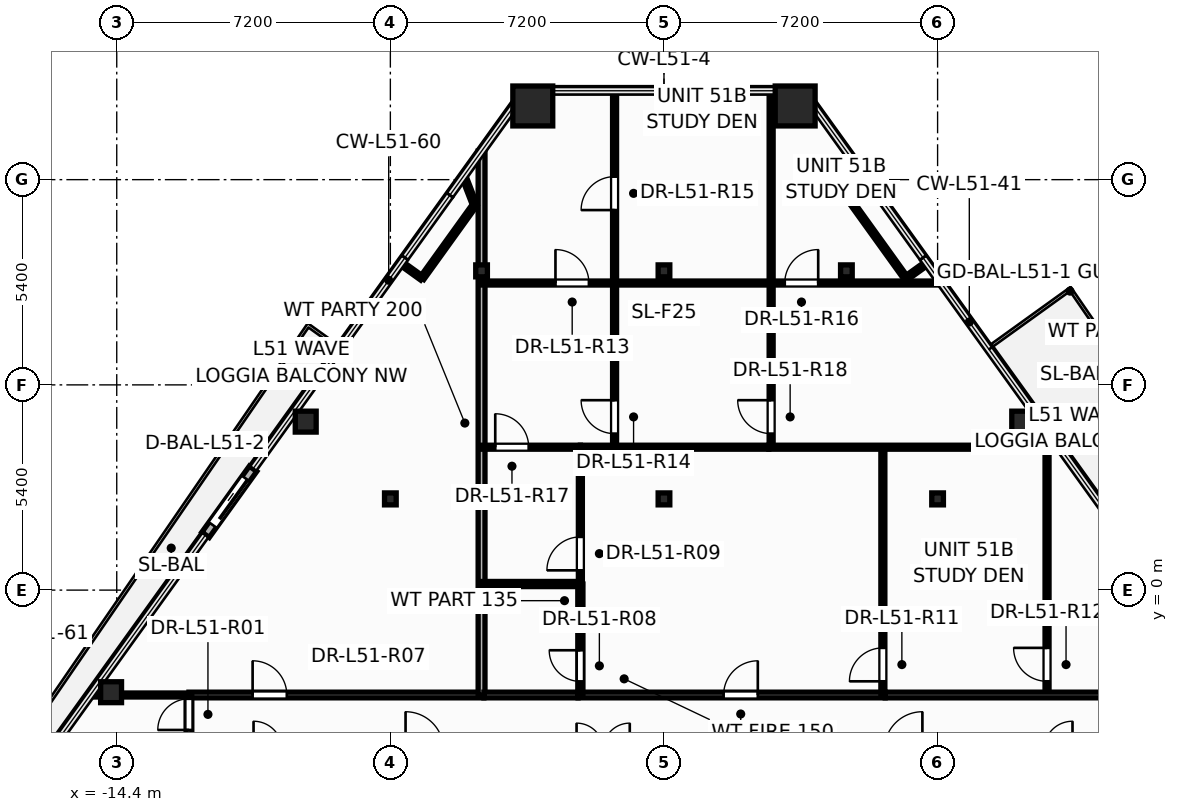
"""IFC4 building model, lengths in metres.
Left out: names, types, materials, properties, quantities, classifications, styles, units other than length and angle.
Written with IfcOpenShell. Run it as: python <this file> out.ifc"""

import sys

from ifc_helpers import new_model, si_unit, direction, frame, frame_2d, origin, origin_2d, place, context, subcontext, project, spatial, rectangle, hollow_rectangle, hollow_circle, i_section, extrude, element, fill, save


model = new_model("IFC4")
c1 = context("Model", 3, precision=1e-05, world=origin(), true_north=direction((0.0, 1.0)))
c2 = subcontext(c1, "Body", "Model", "MODEL_VIEW")
j1 = project(units=[si_unit("LENGTHUNIT", "METRE"), si_unit("PLANEANGLEUNIT", "RADIAN")], contexts=[c1])
p1 = place(None, origin())
s1 = spatial("IfcSite", under=j1, at=p1, CompositionType="ELEMENT")
p2 = place(p1, origin())
s2 = spatial("IfcBuilding", under=s1, at=p2, CompositionType="ELEMENT")
p3 = place(p2, frame((0.0, 0.0, 196.5)))
s3 = spatial("IfcBuildingStorey", under=s2, at=p3, CompositionType="ELEMENT", Elevation=196.5)
for number, where, z_axis, x_axis in (
    (1, (3.452, 12.739, 0.0), (0.0, 0.0, 1.0), (1.0, 0.0, 0.0)),
    (2, (-3.452, 12.739, 0.0), (0.0, 0.0, 1.0), (1.0, 0.0, 0.0)),
):
    element("IfcColumn", number, at=place(p3, frame(where, z_axis=z_axis, x_axis=x_axis)), inside=s3, PredefinedType="COLUMN", context=c2, shape_type="SweptSolid", body=[
        extrude(hollow_rectangle(XDim=1.05, YDim=1.05, WallThickness=0.045, at=origin_2d()), origin(), (0.0, 0.0, 1.0), 3.6),
    ])
for number, where, z_axis, x_axis in (
    (3, (9.427, 4.433, 0.0), (0.0, 0.0, 1.0), (1.0, 0.0, 0.0)),
    (4, (-9.427, 4.433, 0.0), (0.0, 0.0, 1.0), (1.0, 0.0, 0.0)),
    (5, (-14.549, -2.686, 0.0), (0.0, 0.0, 1.0), (1.0, 0.0, 0.0)),
):
    element("IfcColumn", number, at=place(p3, frame(where, z_axis=z_axis, x_axis=x_axis)), inside=s3, PredefinedType="COLUMN", context=c2, shape_type="SweptSolid", body=[
        extrude(hollow_circle(Radius=0.275, WallThickness=0.024, at=origin_2d()), origin(), (0.0, 0.0, 1.0), 3.6),
    ])
for number, where, z_axis, x_axis in (
    (6, (-7.2, 2.4, 0.0), (0.0, 0.0, 1.0), (1.0, 0.0, 0.0)),
    (7, (0.0, 2.4, 0.0), (0.0, 0.0, 1.0), (1.0, 0.0, 0.0)),
    (8, (7.2, 2.4, 0.0), (0.0, 0.0, 1.0), (1.0, 0.0, 0.0)),
    (9, (-4.8, 8.4, 0.0), (0.0, 0.0, 1.0), (1.0, 0.0, 0.0)),
    (10, (0.0, 8.4, 0.0), (0.0, 0.0, 1.0), (1.0, 0.0, 0.0)),
    (11, (4.8, 8.4, 0.0), (0.0, 0.0, 1.0), (1.0, 0.0, 0.0)),
):
    element("IfcColumn", number, at=place(p3, frame(where, z_axis=z_axis, x_axis=x_axis)), inside=s3, PredefinedType="COLUMN", context=c2, shape_type="SweptSolid", body=[
        extrude(i_section(OverallWidth=0.307, OverallDepth=0.314, WebThickness=0.012, FlangeThickness=0.019, at=origin_2d()), origin(), (0.0, 0.0, 1.0), 3.6),
    ])
p4 = place(p3, frame((-10.813, 3.192, -0.015), z_axis=(0.0, 0.0, 1.0), x_axis=(-0.583965085393, -0.811778774693, 0.0)))
e12 = element("IfcWall", 12, at=p4, inside=s3, PredefinedType="STANDARD", context=c2, shape_type="SweptSolid", body=[
    extrude(rectangle(XDim=2.14, YDim=0.24, at=frame_2d((1.07, 0.0))), origin(), (0.0, 0.0, 1.0), 2.807),
])
p5 = place(p4, frame((0.32, 0.0, 0.015)))
e13 = element("IfcOpeningElement", 13, at=p5, cuts=e12, PredefinedType="OPENING", context=c2, shape_type="SweptSolid", body=[
    extrude(rectangle(XDim=1.506, YDim=2.204, at=frame_2d((0.75, 1.102))), frame((0.0, 0.13, 0.0), z_axis=(0.0, -1.0, 0.0), x_axis=(1.0, 0.0, 0.0)), (0.0, 0.0, 1.0), 0.26),
])
p6 = place(p3, frame((-2.26, -2.76, 0.0), z_axis=(0.0, 0.0, 1.0), x_axis=(1.0, 0.0, 0.0)))
e14 = element("IfcWall", 14, at=p6, inside=s3, PredefinedType="PARTITIONING", context=c2, shape_type="SweptSolid", body=[
    extrude(rectangle(XDim=8.08, YDim=0.15, at=frame_2d((4.04, 0.0))), origin(), (0.0, 0.0, 1.0), 2.325),
])
p7 = place(p6, frame((3.829, 0.0, 0.0)))
e15 = element("IfcOpeningElement", 15, at=p7, cuts=e14, PredefinedType="OPENING", context=c2, shape_type="SweptSolid", body=[
    extrude(rectangle(XDim=0.906, YDim=2.104, at=frame_2d((0.45, 1.052))), frame((0.0, 0.085, 0.0), z_axis=(0.0, -1.0, 0.0), x_axis=(1.0, 0.0, 0.0)), (0.0, 0.0, 1.0), 0.17),
])
p8 = place(p3, frame((-12.5, -2.76, 0.0), z_axis=(0.0, 0.0, 1.0), x_axis=(1.0, 0.0, 0.0)))
e16 = element("IfcWall", 16, at=p8, inside=s3, PredefinedType="PARTITIONING", context=c2, shape_type="SweptSolid", body=[
    extrude(rectangle(XDim=7.76, YDim=0.15, at=frame_2d((3.88, 0.0))), origin(), (0.0, 0.0, 1.0), 2.325),
])
p9 = place(p8, frame((1.675, 0.0, 0.0)))
e17 = element("IfcOpeningElement", 17, at=p9, cuts=e16, PredefinedType="OPENING", context=c2, shape_type="SweptSolid", body=[
    extrude(rectangle(XDim=0.906, YDim=2.104, at=frame_2d((0.45, 1.052))), frame((0.0, 0.085, 0.0), z_axis=(0.0, -1.0, 0.0), x_axis=(1.0, 0.0, 0.0)), (0.0, 0.0, 1.0), 0.17),
])
p10 = place(p3, frame((10.08, -2.76, 0.0), z_axis=(0.0, 0.0, 1.0), x_axis=(0.0, 1.0, 0.0)))
e18 = element("IfcWall", 18, at=p10, inside=s3, PredefinedType="PARTITIONING", context=c2, shape_type="SweptSolid", body=[
    extrude(rectangle(XDim=6.971, YDim=0.105, at=frame_2d((3.485, 0.0))), origin(), (0.0, 0.0, 1.0), 2.625),
])
p11 = place(p10, frame((0.36, 0.0, 0.0)))
e19 = element("IfcOpeningElement", 19, at=p11, cuts=e18, PredefinedType="OPENING", context=c2, shape_type="SweptSolid", body=[
    extrude(rectangle(XDim=0.886, YDim=2.104, at=frame_2d((0.44, 1.052))), frame((0.0, 0.062, 0.0), z_axis=(0.0, -1.0, 0.0), x_axis=(1.0, 0.0, 0.0)), (0.0, 0.0, 1.0), 0.125),
])
p12 = place(p3, frame((5.76, -2.76, 0.0), z_axis=(0.0, 0.0, 1.0), x_axis=(0.0, 1.0, 0.0)))
e20 = element("IfcWall", 20, at=p12, inside=s3, PredefinedType="PARTITIONING", context=c2, shape_type="SweptSolid", body=[
    extrude(rectangle(XDim=6.52, YDim=0.105, at=frame_2d((3.26, 0.0))), origin(), (0.0, 0.0, 1.0), 2.325),
])
p13 = place(p12, frame((0.36, 0.0, 0.0)))
e21 = element("IfcOpeningElement", 21, at=p13, cuts=e20, PredefinedType="OPENING", context=c2, shape_type="SweptSolid", body=[
    extrude(rectangle(XDim=0.886, YDim=2.104, at=frame_2d((0.44, 1.052))), frame((0.0, 0.062, 0.0), z_axis=(0.0, -1.0, 0.0), x_axis=(1.0, 0.0, 0.0)), (0.0, 0.0, 1.0), 0.125),
])
p14 = place(p3, frame((-1.3, 8.08, 0.0), z_axis=(0.0, 0.0, 1.0), x_axis=(0.0, 1.0, 0.0)))
e22 = element("IfcWall", 22, at=p14, inside=s3, PredefinedType="PARTITIONING", context=c2, shape_type="SweptSolid", body=[
    extrude(rectangle(XDim=5.059, YDim=0.105, at=frame_2d((2.529, 0.0))), origin(), (0.0, 0.0, 1.0), 2.625),
])
p15 = place(p14, frame((1.919, 0.0, 0.0)))
e23 = element("IfcOpeningElement", 23, at=p15, cuts=e22, PredefinedType="OPENING", context=c2, shape_type="SweptSolid", body=[
    extrude(rectangle(XDim=0.886, YDim=2.104, at=frame_2d((0.44, 1.052))), frame((0.0, 0.062, 0.0), z_axis=(0.0, -1.0, 0.0), x_axis=(1.0, 0.0, 0.0)), (0.0, 0.0, 1.0), 0.125),
])
p16 = place(p3, frame((2.82, 8.08, 0.0), z_axis=(0.0, 0.0, 1.0), x_axis=(0.0, 1.0, 0.0)))
e24 = element("IfcWall", 24, at=p16, inside=s3, PredefinedType="PARTITIONING", context=c2, shape_type="SweptSolid", body=[
    extrude(rectangle(XDim=5.059, YDim=0.105, at=frame_2d((2.529, 0.0))), origin(), (0.0, 0.0, 1.0), 2.625),
])
p17 = place(p3, frame((2.76, 3.76, 0.0), z_axis=(0.0, 0.0, 1.0), x_axis=(1.0, 0.0, 0.0)))
e25 = element("IfcWall", 25, at=p17, inside=s3, PredefinedType="PARTITIONING", context=c2, shape_type="SweptSolid", body=[
    extrude(rectangle(XDim=7.644, YDim=0.105, at=frame_2d((3.822, 0.0))), origin(), (0.0, 0.0, 1.0), 2.625),
])
p18 = place(p3, frame((2.82, 8.08, 0.0), z_axis=(0.0, 0.0, 1.0), x_axis=(1.0, 0.0, 0.0)))
e26 = element("IfcWall", 26, at=p18, inside=s3, PredefinedType="PARTITIONING", context=c2, shape_type="SweptSolid", body=[
    extrude(rectangle(XDim=4.476, YDim=0.105, at=frame_2d((2.238, 0.0))), origin(), (0.0, 0.0, 1.0), 2.625),
])
p19 = place(p18, frame((0.358, 0.0, 0.0)))
e27 = element("IfcOpeningElement", 27, at=p19, cuts=e26, PredefinedType="OPENING", context=c2, shape_type="SweptSolid", body=[
    extrude(rectangle(XDim=0.886, YDim=2.104, at=frame_2d((0.44, 1.052))), frame((0.0, 0.062, 0.0), z_axis=(0.0, -1.0, 0.0), x_axis=(1.0, 0.0, 0.0)), (0.0, 0.0, 1.0), 0.125),
])
p20 = place(p3, frame((-4.8, -2.76, 0.0), z_axis=(0.0, 0.0, 1.0), x_axis=(0.0, 1.0, 0.0)))
e28 = element("IfcWall", 28, at=p20, inside=s3, PredefinedType="PARTITIONING", context=c2, shape_type="SweptSolid", body=[
    extrude(rectangle(XDim=14.31, YDim=0.18, at=frame_2d((7.155, 0.0))), origin(), (0.0, 0.0, 1.0), 2.325),
])
p21 = place(p3, frame((5.822, -2.76, 0.0), z_axis=(0.0, 0.0, 1.0), x_axis=(1.0, 0.0, 0.0)))
e29 = element("IfcWall", 29, at=p21, inside=s3, PredefinedType="PARTITIONING", context=c2, shape_type="SweptSolid", body=[
    extrude(rectangle(XDim=6.678, YDim=0.15, at=frame_2d((3.339, 0.0))), origin(), (0.0, 0.0, 1.0), 2.325),
])
p22 = place(p3, frame((-1.3, 3.76, 0.0), z_axis=(0.0, 0.0, 1.0), x_axis=(0.0, 1.0, 0.0)))
e30 = element("IfcWall", 30, at=p22, inside=s3, PredefinedType="PARTITIONING", context=c2, shape_type="SweptSolid", body=[
    extrude(rectangle(XDim=4.32, YDim=0.105, at=frame_2d((2.16, 0.0))), origin(), (0.0, 0.0, 1.0), 3.35),
])
p23 = place(p22, frame((0.357, 0.0, 0.0)))
e31 = element("IfcOpeningElement", 31, at=p23, cuts=e30, PredefinedType="OPENING", context=c2, shape_type="SweptSolid", body=[
    extrude(rectangle(XDim=0.886, YDim=2.104, at=frame_2d((0.44, 1.052))), frame((0.0, 0.062, 0.0), z_axis=(0.0, -1.0, 0.0), x_axis=(1.0, 0.0, 0.0)), (0.0, 0.0, 1.0), 0.125),
])
p24 = place(p3, frame((2.82, 3.76, 0.0), z_axis=(0.0, 0.0, 1.0), x_axis=(0.0, 1.0, 0.0)))
e32 = element("IfcWall", 32, at=p24, inside=s3, PredefinedType="PARTITIONING", context=c2, shape_type="SweptSolid", body=[
    extrude(rectangle(XDim=4.32, YDim=0.105, at=frame_2d((2.16, 0.0))), origin(), (0.0, 0.0, 1.0), 3.35),
])
p25 = place(p24, frame((0.357, 0.0, 0.0)))
e33 = element("IfcOpeningElement", 33, at=p25, cuts=e32, PredefinedType="OPENING", context=c2, shape_type="SweptSolid", body=[
    extrude(rectangle(XDim=0.886, YDim=2.104, at=frame_2d((0.44, 1.052))), frame((0.0, 0.062, 0.0), z_axis=(0.0, -1.0, 0.0), x_axis=(1.0, 0.0, 0.0)), (0.0, 0.0, 1.0), 0.125),
])
p26 = place(p3, frame((-2.2, 3.76, 0.0), z_axis=(0.0, 0.0, 1.0), x_axis=(1.0, 0.0, 0.0)))
e34 = element("IfcWall", 34, at=p26, inside=s3, PredefinedType="PARTITIONING", context=c2, shape_type="SweptSolid", body=[
    extrude(rectangle(XDim=4.958, YDim=0.105, at=frame_2d((2.479, 0.0))), origin(), (0.0, 0.0, 1.0), 2.325),
])
p27 = place(p3, frame((-1.3, 8.08, 0.0), z_axis=(0.0, 0.0, 1.0), x_axis=(1.0, 0.0, 0.0)))
e35 = element("IfcWall", 35, at=p27, inside=s3, PredefinedType="PARTITIONING", context=c2, shape_type="SweptSolid", body=[
    extrude(rectangle(XDim=4.12, YDim=0.105, at=frame_2d((2.06, 0.0))), origin(), (0.0, 0.0, 1.0), 2.325),
])
p28 = place(p3, frame((-2.2, 0.16, 0.0), z_axis=(0.0, 0.0, 1.0), x_axis=(0.0, 1.0, 0.0)))
e36 = element("IfcWall", 36, at=p28, inside=s3, PredefinedType="PARTITIONING", context=c2, shape_type="SweptSolid", body=[
    extrude(rectangle(XDim=3.6, YDim=0.105, at=frame_2d((1.8, 0.0))), origin(), (0.0, 0.0, 1.0), 2.325),
])
p29 = place(p28, frame((0.36, 0.0, 0.0)))
e37 = element("IfcOpeningElement", 37, at=p29, cuts=e36, PredefinedType="OPENING", context=c2, shape_type="SweptSolid", body=[
    extrude(rectangle(XDim=0.886, YDim=2.104, at=frame_2d((0.44, 1.052))), frame((0.0, 0.062, 0.0), z_axis=(0.0, -1.0, 0.0), x_axis=(1.0, 0.0, 0.0)), (0.0, 0.0, 1.0), 0.125),
])
p30 = place(p3, frame((-4.8, 8.08, 0.0), z_axis=(0.0, 0.0, 1.0), x_axis=(1.0, 0.0, 0.0)))
e38 = element("IfcWall", 38, at=p30, inside=s3, PredefinedType="PARTITIONING", context=c2, shape_type="SweptSolid", body=[
    extrude(rectangle(XDim=3.5, YDim=0.105, at=frame_2d((1.75, 0.0))), origin(), (0.0, 0.0, 1.0), 2.625),
])
p31 = place(p30, frame((1.945, 0.0, 0.0)))
e39 = element("IfcOpeningElement", 39, at=p31, cuts=e38, PredefinedType="OPENING", context=c2, shape_type="SweptSolid", body=[
    extrude(rectangle(XDim=0.886, YDim=2.104, at=frame_2d((0.44, 1.052))), frame((0.0, 0.062, 0.0), z_axis=(0.0, -1.0, 0.0), x_axis=(1.0, 0.0, 0.0)), (0.0, 0.0, 1.0), 0.125),
])
p32 = place(p3, frame((-2.2, -2.76, 0.0), z_axis=(0.0, 0.0, 1.0), x_axis=(0.0, 1.0, 0.0)))
e40 = element("IfcWall", 40, at=p32, inside=s3, PredefinedType="PARTITIONING", context=c2, shape_type="SweptSolid", body=[
    extrude(rectangle(XDim=2.92, YDim=0.135, at=frame_2d((1.46, 0.0))), origin(), (0.0, 0.0, 1.0), 3.35),
])
p33 = place(p32, frame((0.357, 0.0, 0.0)))
e41 = element("IfcOpeningElement", 41, at=p33, cuts=e40, PredefinedType="OPENING", context=c2, shape_type="SweptSolid", body=[
    extrude(rectangle(XDim=0.826, YDim=2.104, at=frame_2d((0.41, 1.052))), frame((0.0, 0.078, 0.0), z_axis=(0.0, -1.0, 0.0), x_axis=(1.0, 0.0, 0.0)), (0.0, 0.0, 1.0), 0.155),
])
p34 = place(p3, frame((-4.738, -2.76, 0.0), z_axis=(0.0, 0.0, 1.0), x_axis=(1.0, 0.0, 0.0)))
e42 = element("IfcWall", 42, at=p34, inside=s3, PredefinedType="PARTITIONING", context=c2, shape_type="SweptSolid", body=[
    extrude(rectangle(XDim=2.476, YDim=0.15, at=frame_2d((1.238, 0.0))), origin(), (0.0, 0.0, 1.0), 2.969),
])
p35 = place(p3, frame((-4.8, 0.16, 0.0), z_axis=(0.0, 0.0, 1.0), x_axis=(1.0, 0.0, 0.0)))
e43 = element("IfcWall", 43, at=p35, inside=s3, PredefinedType="PARTITIONING", context=c2, shape_type="SweptSolid", body=[
    extrude(rectangle(XDim=2.6, YDim=0.135, at=frame_2d((1.3, 0.0))), origin(), (0.0, 0.0, 1.0), 2.969),
])
p36 = place(p3, frame((-4.8, 3.76, 0.0), z_axis=(0.0, 0.0, 1.0), x_axis=(1.0, 0.0, 0.0)))
e44 = element("IfcWall", 44, at=p36, inside=s3, PredefinedType="PARTITIONING", context=c2, shape_type="SweptSolid", body=[
    extrude(rectangle(XDim=2.6, YDim=0.105, at=frame_2d((1.3, 0.0))), origin(), (0.0, 0.0, 1.0), 2.969),
])
p37 = place(p36, frame((0.36, 0.0, 0.0)))
e45 = element("IfcOpeningElement", 45, at=p37, cuts=e44, PredefinedType="OPENING", context=c2, shape_type="SweptSolid", body=[
    extrude(rectangle(XDim=0.886, YDim=2.104, at=frame_2d((0.44, 1.052))), frame((0.0, 0.062, 0.0), z_axis=(0.0, -1.0, 0.0), x_axis=(1.0, 0.0, 0.0)), (0.0, 0.0, 1.0), 0.125),
])
p38 = place(p3, frame((-15.095, -2.76, 0.0), z_axis=(0.0, 0.0, 1.0), x_axis=(1.0, 0.0, 0.0)))
e46 = element("IfcWall", 46, at=p38, inside=s3, PredefinedType="PARTITIONING", context=c2, shape_type="SweptSolid", body=[
    extrude(rectangle(XDim=2.595, YDim=0.105, at=frame_2d((1.297, 0.0))), origin(), (0.0, 0.0, 1.0), 2.625),
])
for number, where, z_axis, x_axis in (
    (47, (-4.979, 10.137, 0.0), (0.0, 0.0, 1.0), (-0.584, -0.812, 0.0)),
    (48, (6.368, 8.206, 0.0), (0.0, 0.0, 1.0), (-0.584, 0.812, 0.0)),
):
    element("IfcWall", number, at=place(p3, frame(where, z_axis=z_axis, x_axis=x_axis)), inside=s3, PredefinedType="PARTITIONING", context=c2, shape_type="SweptSolid", body=[
        extrude(rectangle(XDim=2.378, YDim=0.12, at=frame_2d((1.189, 0.0))), origin(), (0.0, 0.0, 1.0), 3.35),
    ])
p39 = place(p3, frame((-12.5, -4.24, 0.0), z_axis=(0.0, 0.0, 1.0), x_axis=(0.0, 1.0, 0.0)))
e49 = element("IfcWall", 49, at=p39, inside=s3, PredefinedType="PARTITIONING", context=c2, shape_type="SweptSolid", body=[
    extrude(rectangle(XDim=1.48, YDim=0.15, at=frame_2d((0.74, 0.0))), origin(), (0.0, 0.0, 1.0), 2.325),
])
p40 = place(p39, frame((0.56, 0.0, 0.0)))
e50 = element("IfcOpeningElement", 50, at=p40, cuts=e49, PredefinedType="OPENING", context=c2, shape_type="SweptSolid", body=[
    extrude(rectangle(XDim=0.826, YDim=2.104, at=frame_2d((0.41, 1.052))), frame((0.0, 0.085, 0.0), z_axis=(0.0, -1.0, 0.0), x_axis=(1.0, 0.0, 0.0)), (0.0, 0.0, 1.0), 0.17),
])
for number, where, z_axis, x_axis in (
    (51, (-5.268, 10.882, 0.0), (0.0, 0.0, 1.0), (0.362, -0.932, 0.0)),
    (52, (4.979, 10.137, 0.0), (0.0, 0.0, 1.0), (0.362, 0.932, 0.0)),
):
    element("IfcWall", number, at=place(p3, frame(where, z_axis=z_axis, x_axis=x_axis)), inside=s3, PredefinedType="PARTITIONING", context=c2, shape_type="SweptSolid", body=[
        extrude(rectangle(XDim=0.8, YDim=0.12, at=frame_2d((0.4, 0.0))), origin(), (0.0, 0.0, 1.0), 2.792),
    ])
for number, where, z_axis, x_axis in (
    (53, (-6.368, 8.206, 0.0), (0.0, 0.0, 1.0), (-0.812, 0.584, 0.0)),
    (54, (6.912, 8.598, 0.0), (0.0, 0.0, 1.0), (-0.812, -0.584, 0.0)),
):
    element("IfcWall", number, at=place(p3, frame(where, z_axis=z_axis, x_axis=x_axis)), inside=s3, PredefinedType="PARTITIONING", context=c2, shape_type="SweptSolid", body=[
        extrude(rectangle(XDim=0.67, YDim=0.12, at=frame_2d((0.335, 0.0))), origin(), (0.0, 0.0, 1.0), 2.792),
    ])
p41 = place(p5, origin())
e55 = element("IfcDoor", 55, at=p41, inside=s3, OperationType="SLIDING_TO_RIGHT", PredefinedType="DOOR", context=c2, shape_type="SweptSolid", body=[
    extrude(rectangle(XDim=1.5, YDim=2.2, at=frame_2d((0.75, 1.1))), frame((0.0, 0.025, 0.0), z_axis=(0.0, -1.0, 0.0), x_axis=(1.0, 0.0, 0.0)), (0.0, 0.0, 1.0), 0.05),
])
fill(e13, e55)
p42 = place(p40, origin())
e56 = element("IfcDoor", 56, at=p42, inside=s3, OperationType="SINGLE_SWING_LEFT", PredefinedType="DOOR", context=c2, shape_type="SweptSolid", body=[
    extrude(rectangle(XDim=0.82, YDim=2.1, at=frame_2d((0.41, 1.05))), frame((0.0, 0.025, 0.0), z_axis=(0.0, -1.0, 0.0), x_axis=(1.0, 0.0, 0.0)), (0.0, 0.0, 1.0), 0.05),
])
fill(e50, e56)
p43 = place(p9, origin())
e57 = element("IfcDoor", 57, at=p43, inside=s3, OperationType="SINGLE_SWING_LEFT", PredefinedType="DOOR", context=c2, shape_type="SweptSolid", body=[
    extrude(rectangle(XDim=0.9, YDim=2.1, at=frame_2d((0.45, 1.05))), frame((0.0, 0.025, 0.0), z_axis=(0.0, -1.0, 0.0), x_axis=(1.0, 0.0, 0.0)), (0.0, 0.0, 1.0), 0.05),
])
fill(e17, e57)
p44 = place(p33, origin())
e58 = element("IfcDoor", 58, at=p44, inside=s3, OperationType="SINGLE_SWING_RIGHT", PredefinedType="DOOR", context=c2, shape_type="SweptSolid", body=[
    extrude(rectangle(XDim=0.82, YDim=2.1, at=frame_2d((0.41, 1.05))), frame((0.0, 0.025, 0.0), z_axis=(0.0, -1.0, 0.0), x_axis=(1.0, 0.0, 0.0)), (0.0, 0.0, 1.0), 0.05),
])
fill(e41, e58)
p45 = place(p29, origin())
e59 = element("IfcDoor", 59, at=p45, inside=s3, OperationType="SINGLE_SWING_LEFT", PredefinedType="DOOR", context=c2, shape_type="SweptSolid", body=[
    extrude(rectangle(XDim=0.88, YDim=2.1, at=frame_2d((0.44, 1.05))), frame((0.0, 0.025, 0.0), z_axis=(0.0, -1.0, 0.0), x_axis=(1.0, 0.0, 0.0)), (0.0, 0.0, 1.0), 0.05),
])
fill(e37, e59)
p46 = place(p7, origin())
e60 = element("IfcDoor", 60, at=p46, inside=s3, OperationType="SINGLE_SWING_RIGHT", PredefinedType="DOOR", context=c2, shape_type="SweptSolid", body=[
    extrude(rectangle(XDim=0.9, YDim=2.1, at=frame_2d((0.45, 1.05))), frame((0.0, 0.025, 0.0), z_axis=(0.0, -1.0, 0.0), x_axis=(1.0, 0.0, 0.0)), (0.0, 0.0, 1.0), 0.05),
])
fill(e15, e60)
p47 = place(p13, origin())
e61 = element("IfcDoor", 61, at=p47, inside=s3, OperationType="SINGLE_SWING_LEFT", PredefinedType="DOOR", context=c2, shape_type="SweptSolid", body=[
    extrude(rectangle(XDim=0.88, YDim=2.1, at=frame_2d((0.44, 1.05))), frame((0.0, 0.025, 0.0), z_axis=(0.0, -1.0, 0.0), x_axis=(1.0, 0.0, 0.0)), (0.0, 0.0, 1.0), 0.05),
])
fill(e21, e61)
p48 = place(p11, origin())
e62 = element("IfcDoor", 62, at=p48, inside=s3, OperationType="SINGLE_SWING_RIGHT", PredefinedType="DOOR", context=c2, shape_type="SweptSolid", body=[
    extrude(rectangle(XDim=0.88, YDim=2.1, at=frame_2d((0.44, 1.05))), frame((0.0, 0.025, 0.0), z_axis=(0.0, -1.0, 0.0), x_axis=(1.0, 0.0, 0.0)), (0.0, 0.0, 1.0), 0.05),
])
fill(e19, e62)
p49 = place(p31, origin())
e63 = element("IfcDoor", 63, at=p49, inside=s3, OperationType="SINGLE_SWING_LEFT", PredefinedType="DOOR", context=c2, shape_type="SweptSolid", body=[
    extrude(rectangle(XDim=0.88, YDim=2.1, at=frame_2d((0.44, 1.05))), frame((0.0, 0.025, 0.0), z_axis=(0.0, -1.0, 0.0), x_axis=(1.0, 0.0, 0.0)), (0.0, 0.0, 1.0), 0.05),
])
fill(e39, e63)
p50 = place(p23, origin())
e64 = element("IfcDoor", 64, at=p50, inside=s3, OperationType="SINGLE_SWING_RIGHT", PredefinedType="DOOR", context=c2, shape_type="SweptSolid", body=[
    extrude(rectangle(XDim=0.88, YDim=2.1, at=frame_2d((0.44, 1.05))), frame((0.0, 0.025, 0.0), z_axis=(0.0, -1.0, 0.0), x_axis=(1.0, 0.0, 0.0)), (0.0, 0.0, 1.0), 0.05),
])
fill(e31, e64)
p51 = place(p15, origin())
e65 = element("IfcDoor", 65, at=p51, inside=s3, OperationType="SINGLE_SWING_LEFT", PredefinedType="DOOR", context=c2, shape_type="SweptSolid", body=[
    extrude(rectangle(XDim=0.88, YDim=2.1, at=frame_2d((0.44, 1.05))), frame((0.0, 0.025, 0.0), z_axis=(0.0, -1.0, 0.0), x_axis=(1.0, 0.0, 0.0)), (0.0, 0.0, 1.0), 0.05),
])
fill(e23, e65)
p52 = place(p19, origin())
e66 = element("IfcDoor", 66, at=p52, inside=s3, OperationType="SINGLE_SWING_RIGHT", PredefinedType="DOOR", context=c2, shape_type="SweptSolid", body=[
    extrude(rectangle(XDim=0.88, YDim=2.1, at=frame_2d((0.44, 1.05))), frame((0.0, 0.025, 0.0), z_axis=(0.0, -1.0, 0.0), x_axis=(1.0, 0.0, 0.0)), (0.0, 0.0, 1.0), 0.05),
])
fill(e27, e66)
p53 = place(p37, origin())
e67 = element("IfcDoor", 67, at=p53, inside=s3, OperationType="SINGLE_SWING_LEFT", PredefinedType="DOOR", context=c2, shape_type="SweptSolid", body=[
    extrude(rectangle(XDim=0.88, YDim=2.1, at=frame_2d((0.44, 1.05))), frame((0.0, 0.025, 0.0), z_axis=(0.0, -1.0, 0.0), x_axis=(1.0, 0.0, 0.0)), (0.0, 0.0, 1.0), 0.05),
])
fill(e45, e67)
p54 = place(p25, origin())
e68 = element("IfcDoor", 68, at=p54, inside=s3, OperationType="SINGLE_SWING_RIGHT", PredefinedType="DOOR", context=c2, shape_type="SweptSolid", body=[
    extrude(rectangle(XDim=0.88, YDim=2.1, at=frame_2d((0.44, 1.05))), frame((0.0, 0.025, 0.0), z_axis=(0.0, -1.0, 0.0), x_axis=(1.0, 0.0, 0.0)), (0.0, 0.0, 1.0), 0.05),
])
fill(e33, e68)
save(model, sys.argv[1])
